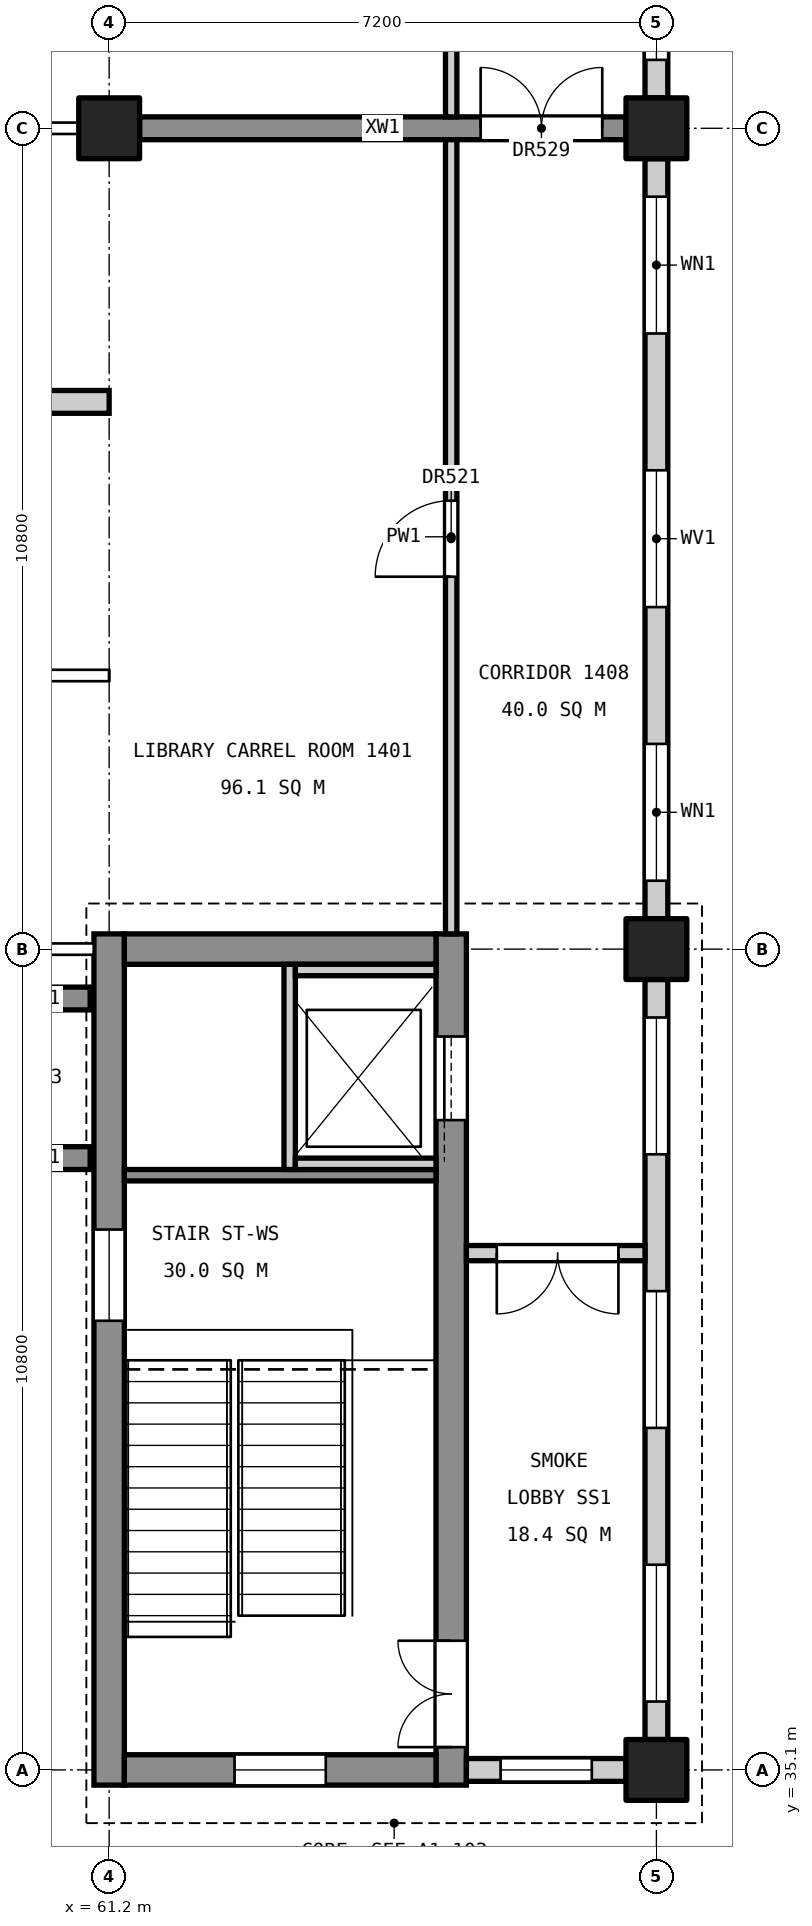
"""IFC4 building model, lengths in metres.
Left out: names, types, materials, properties, quantities, classifications, styles, units other than length and angle.
Written with IfcOpenShell. Run it as: python <this file> out.ifc"""

import sys

from ifc_helpers import new_model, si_unit, direction, frame, frame_2d, origin, origin_2d, place, context, subcontext, project, spatial, rectangle, extrude, element, fill, save


model = new_model("IFC4")
c1 = context("Model", 3, precision=1e-05, world=origin(), true_north=direction((0.0, 1.0)))
c2 = subcontext(c1, "Body", "Model", "MODEL_VIEW")
j1 = project(units=[si_unit("LENGTHUNIT", "METRE"), si_unit("PLANEANGLEUNIT", "RADIAN")], contexts=[c1])
p1 = place(None, origin())
s1 = spatial("IfcSite", under=j1, at=p1, CompositionType="ELEMENT")
p2 = place(p1, origin())
s2 = spatial("IfcBuilding", under=s1, at=p2, CompositionType="ELEMENT")
p3 = place(p2, frame((0.0, 0.0, 70.2)))
s3 = spatial("IfcBuildingStorey", under=s2, at=p3, CompositionType="ELEMENT", Elevation=70.2)
for number, where, z_axis, x_axis in (
    (1, (61.2, 56.7, 0.0), (0.0, 0.0, 1.0), (1.0, 0.0, 0.0)),
    (2, (68.4, 35.1, 0.0), (0.0, 0.0, 1.0), (1.0, 0.0, 0.0)),
    (3, (68.4, 45.9, 0.0), (0.0, 0.0, 1.0), (1.0, 0.0, 0.0)),
    (4, (68.4, 56.7, 0.0), (0.0, 0.0, 1.0), (1.0, 0.0, 0.0)),
):
    element("IfcColumn", number, at=place(p3, frame(where, z_axis=z_axis, x_axis=x_axis)), inside=s3, PredefinedType="COLUMN", context=c2, shape_type="SweptSolid", body=[
        extrude(rectangle(XDim=0.8, YDim=0.8, at=origin_2d()), origin(), (0.0, 0.0, 1.0), 4.8),
    ])
p4 = place(p3, frame((61.2, 34.9, 0.0), z_axis=(0.0, 0.0, 1.0), x_axis=(0.0, 1.0, 0.0)))
e5 = element("IfcWall", 5, at=p4, inside=s3, PredefinedType="SHEAR", context=c2, shape_type="SweptSolid", body=[
    extrude(rectangle(XDim=11.2, YDim=0.4, at=frame_2d((5.6, 0.0))), origin(), (0.0, 0.0, 1.0), 4.55),
])
p5 = place(p4, frame((6.11, 0.0, 3.4)))
e6 = element("IfcOpeningElement", 6, at=p5, cuts=e5, PredefinedType="OPENING", context=c2, shape_type="SweptSolid", body=[
    extrude(rectangle(XDim=1.2, YDim=0.9, at=frame_2d((0.6, 0.45))), frame((0.0, 0.21, 0.0), z_axis=(0.0, -1.0, 0.0), x_axis=(1.0, 0.0, 0.0)), (0.0, 0.0, 1.0), 0.42),
])
p6 = place(p3, frame((65.7, 34.9, 0.0), z_axis=(0.0, 0.0, 1.0), x_axis=(0.0, 1.0, 0.0)))
e7 = element("IfcWall", 7, at=p6, inside=s3, PredefinedType="SHEAR", context=c2, shape_type="SweptSolid", body=[
    extrude(rectangle(XDim=11.2, YDim=0.4, at=frame_2d((5.6, 0.0))), origin(), (0.0, 0.0, 1.0), 4.55),
])
p7 = place(p6, frame((0.5, 0.0, 0.0)))
e8 = element("IfcOpeningElement", 8, at=p7, cuts=e7, PredefinedType="OPENING", context=c2, shape_type="SweptSolid", body=[
    extrude(rectangle(XDim=1.4, YDim=2.1, at=frame_2d((0.7, 1.05))), frame((0.0, 0.21, 0.0), z_axis=(0.0, -1.0, 0.0), x_axis=(1.0, 0.0, 0.0)), (0.0, 0.0, 1.0), 0.42),
])
p8 = place(p6, frame((8.75, 0.0, 0.0)))
e9 = element("IfcOpeningElement", 9, at=p8, cuts=e7, PredefinedType="OPENING", context=c2, shape_type="SweptSolid", body=[
    extrude(rectangle(XDim=1.1, YDim=2.1, at=frame_2d((0.55, 1.05))), frame((0.0, 0.21, 0.0), z_axis=(0.0, -1.0, 0.0), x_axis=(1.0, 0.0, 0.0)), (0.0, 0.0, 1.0), 0.42),
])
p9 = place(p3, frame((61.4, 35.1, 0.0), z_axis=(0.0, 0.0, 1.0), x_axis=(1.0, 0.0, 0.0)))
e10 = element("IfcWall", 10, at=p9, inside=s3, PredefinedType="SHEAR", context=c2, shape_type="SweptSolid", body=[
    extrude(rectangle(XDim=4.1, YDim=0.4, at=frame_2d((2.05, 0.0))), origin(), (0.0, 0.0, 1.0), 4.55),
])
p10 = place(p9, frame((1.45, 0.0, 3.4)))
e11 = element("IfcOpeningElement", 11, at=p10, cuts=e10, PredefinedType="OPENING", context=c2, shape_type="SweptSolid", body=[
    extrude(rectangle(XDim=1.2, YDim=0.9, at=frame_2d((0.6, 0.45))), frame((0.0, 0.21, 0.0), z_axis=(0.0, -1.0, 0.0), x_axis=(1.0, 0.0, 0.0)), (0.0, 0.0, 1.0), 0.42),
])
p11 = place(p3, frame((61.4, 45.9, 0.0), z_axis=(0.0, 0.0, 1.0), x_axis=(1.0, 0.0, 0.0)))
e12 = element("IfcWall", 12, at=p11, inside=s3, PredefinedType="SHEAR", context=c2, shape_type="SweptSolid", body=[
    extrude(rectangle(XDim=4.1, YDim=0.4, at=frame_2d((2.05, 0.0))), origin(), (0.0, 0.0, 1.0), 4.55),
])
for number, where, z_axis, x_axis in (
    (13, (60.95, 43.15, 0.0), (0.0, 0.0, 1.0), (-1.0, 0.0, 0.0)),
    (14, (60.95, 45.25, 0.0), (0.0, 0.0, 1.0), (-1.0, 0.0, 0.0)),
):
    element("IfcWall", number, at=place(p3, frame(where, z_axis=z_axis, x_axis=x_axis)), inside=s3, PredefinedType="SHEAR", context=c2, shape_type="SweptSolid", body=[
        extrude(rectangle(XDim=1.25, YDim=0.3, at=frame_2d((0.625, 0.0))), origin(), (0.0, 0.0, 1.0), 4.8),
    ])
p12 = place(p3, frame((61.6, 56.7, 0.0), z_axis=(0.0, 0.0, 1.0), x_axis=(1.0, 0.0, 0.0)))
e15 = element("IfcWall", 15, at=p12, inside=s3, PredefinedType="SHEAR", context=c2, shape_type="SweptSolid", body=[
    extrude(rectangle(XDim=6.4, YDim=0.3, at=frame_2d((3.2, 0.0))), origin(), (0.0, 0.0, 1.0), 4.55),
])
p13 = place(p12, frame((4.488, 0.0, 0.0)))
e16 = element("IfcOpeningElement", 16, at=p13, cuts=e15, PredefinedType="OPENING", context=c2, shape_type="SweptSolid", body=[
    extrude(rectangle(XDim=1.6, YDim=2.1, at=frame_2d((0.8, 1.05))), frame((0.0, 0.16, 0.0), z_axis=(0.0, -1.0, 0.0), x_axis=(1.0, 0.0, 0.0)), (0.0, 0.0, 1.0), 0.32),
])
p14 = place(p3, frame((61.4, 42.925, 0.0), z_axis=(0.0, 0.0, 1.0), x_axis=(1.0, 0.0, 0.0)))
e17 = element("IfcWall", 17, at=p14, inside=s3, PredefinedType="SOLIDWALL", context=c2, shape_type="SweptSolid", body=[
    extrude(rectangle(XDim=4.1, YDim=0.15, at=frame_2d((2.05, 0.0))), origin(), (0.0, 0.0, 1.0), 4.55),
])
p15 = place(p3, frame((63.575, 43.0, 0.0), z_axis=(0.0, 0.0, 1.0), x_axis=(0.0, 1.0, 0.0)))
e18 = element("IfcWall", 18, at=p15, inside=s3, PredefinedType="SOLIDWALL", context=c2, shape_type="SweptSolid", body=[
    extrude(rectangle(XDim=2.7, YDim=0.15, at=frame_2d((1.35, 0.0))), origin(), (0.0, 0.0, 1.0), 4.55),
])
for number, where, z_axis, x_axis in (
    (19, (63.65, 43.075, 0.0), (0.0, 0.0, 1.0), (1.0, 0.0, 0.0)),
    (20, (63.65, 45.625, 0.0), (0.0, 0.0, 1.0), (1.0, 0.0, 0.0)),
):
    element("IfcWall", number, at=place(p3, frame(where, z_axis=z_axis, x_axis=x_axis)), inside=s3, PredefinedType="SOLIDWALL", context=c2, shape_type="SweptSolid", body=[
        extrude(rectangle(XDim=1.85, YDim=0.15, at=frame_2d((0.925, 0.0))), origin(), (0.0, 0.0, 1.0), 4.55),
    ])
p16 = place(p3, frame((65.9, 35.1, 0.0), z_axis=(0.0, 0.0, 1.0), x_axis=(1.0, 0.0, 0.0)))
e21 = element("IfcWall", 21, at=p16, inside=s3, PredefinedType="STANDARD", context=c2, shape_type="SweptSolid", body=[
    extrude(rectangle(XDim=2.1, YDim=0.3, at=frame_2d((1.05, 0.0))), origin(), (0.0, 0.0, 1.0), 3.85),
])
p17 = place(p16, frame((0.45, 0.0, 0.9)))
e22 = element("IfcOpeningElement", 22, at=p17, cuts=e21, PredefinedType="OPENING", context=c2, shape_type="SweptSolid", body=[
    extrude(rectangle(XDim=1.2, YDim=2.4, at=frame_2d((0.6, 1.2))), frame((0.0, 0.16, 0.0), z_axis=(0.0, -1.0, 0.0), x_axis=(1.0, 0.0, 0.0)), (0.0, 0.0, 1.0), 0.32),
])
p18 = place(p3, frame((68.4, 35.5, 0.0), z_axis=(0.0, 0.0, 1.0), x_axis=(0.0, 1.0, 0.0)))
e23 = element("IfcWall", 23, at=p18, inside=s3, PredefinedType="STANDARD", context=c2, shape_type="SweptSolid", body=[
    extrude(rectangle(XDim=10.0, YDim=0.3, at=frame_2d((5.0, 0.0))), origin(), (0.0, 0.0, 1.0), 3.55),
])
p19 = place(p18, frame((0.5, 0.0, 0.9)))
e24 = element("IfcOpeningElement", 24, at=p19, cuts=e23, PredefinedType="OPENING", context=c2, shape_type="SweptSolid", body=[
    extrude(rectangle(XDim=1.8, YDim=2.4, at=frame_2d((0.9, 1.2))), frame((0.0, 0.16, 0.0), z_axis=(0.0, -1.0, 0.0), x_axis=(1.0, 0.0, 0.0)), (0.0, 0.0, 1.0), 0.32),
])
p20 = place(p18, frame((4.1, 0.0, 0.9)))
e25 = element("IfcOpeningElement", 25, at=p20, cuts=e23, PredefinedType="OPENING", context=c2, shape_type="SweptSolid", body=[
    extrude(rectangle(XDim=1.8, YDim=2.4, at=frame_2d((0.9, 1.2))), frame((0.0, 0.16, 0.0), z_axis=(0.0, -1.0, 0.0), x_axis=(1.0, 0.0, 0.0)), (0.0, 0.0, 1.0), 0.32),
])
p21 = place(p18, frame((7.7, 0.0, 0.9)))
e26 = element("IfcOpeningElement", 26, at=p21, cuts=e23, PredefinedType="OPENING", context=c2, shape_type="SweptSolid", body=[
    extrude(rectangle(XDim=1.8, YDim=2.4, at=frame_2d((0.9, 1.2))), frame((0.0, 0.16, 0.0), z_axis=(0.0, -1.0, 0.0), x_axis=(1.0, 0.0, 0.0)), (0.0, 0.0, 1.0), 0.32),
])
p22 = place(p3, frame((68.4, 46.3, 0.0), z_axis=(0.0, 0.0, 1.0), x_axis=(0.0, 1.0, 0.0)))
e27 = element("IfcWall", 27, at=p22, inside=s3, PredefinedType="STANDARD", context=c2, shape_type="SweptSolid", body=[
    extrude(rectangle(XDim=10.0, YDim=0.3, at=frame_2d((5.0, 0.0))), origin(), (0.0, 0.0, 1.0), 3.55),
])
p23 = place(p22, frame((0.5, 0.0, 0.9)))
e28 = element("IfcOpeningElement", 28, at=p23, cuts=e27, PredefinedType="OPENING", context=c2, shape_type="SweptSolid", body=[
    extrude(rectangle(XDim=1.8, YDim=2.4, at=frame_2d((0.9, 1.2))), frame((0.0, 0.16, 0.0), z_axis=(0.0, -1.0, 0.0), x_axis=(1.0, 0.0, 0.0)), (0.0, 0.0, 1.0), 0.32),
])
p24 = place(p22, frame((4.1, 0.0, 0.9)))
e29 = element("IfcOpeningElement", 29, at=p24, cuts=e27, PredefinedType="OPENING", context=c2, shape_type="SweptSolid", body=[
    extrude(rectangle(XDim=1.8, YDim=2.4, at=frame_2d((0.9, 1.2))), frame((0.0, 0.16, 0.0), z_axis=(0.0, -1.0, 0.0), x_axis=(1.0, 0.0, 0.0)), (0.0, 0.0, 1.0), 0.32),
])
p25 = place(p22, frame((7.7, 0.0, 0.9)))
e30 = element("IfcOpeningElement", 30, at=p25, cuts=e27, PredefinedType="OPENING", context=c2, shape_type="SweptSolid", body=[
    extrude(rectangle(XDim=1.8, YDim=2.4, at=frame_2d((0.9, 1.2))), frame((0.0, 0.16, 0.0), z_axis=(0.0, -1.0, 0.0), x_axis=(1.0, 0.0, 0.0)), (0.0, 0.0, 1.0), 0.32),
])
p26 = place(p3, frame((68.4, 57.1, 0.0), z_axis=(0.0, 0.0, 1.0), x_axis=(0.0, 1.0, 0.0)))
e31 = element("IfcWall", 31, at=p26, inside=s3, PredefinedType="STANDARD", context=c2, shape_type="SweptSolid", body=[
    extrude(rectangle(XDim=10.0, YDim=0.3, at=frame_2d((5.0, 0.0))), origin(), (0.0, 0.0, 1.0), 3.55),
])
p27 = place(p26, frame((0.5, 0.0, 0.9)))
e32 = element("IfcOpeningElement", 32, at=p27, cuts=e31, PredefinedType="OPENING", context=c2, shape_type="SweptSolid", body=[
    extrude(rectangle(XDim=1.8, YDim=2.4, at=frame_2d((0.9, 1.2))), frame((0.0, 0.16, 0.0), z_axis=(0.0, -1.0, 0.0), x_axis=(1.0, 0.0, 0.0)), (0.0, 0.0, 1.0), 0.32),
])
p28 = place(p26, frame((4.1, 0.0, 0.9)))
e33 = element("IfcOpeningElement", 33, at=p28, cuts=e31, PredefinedType="OPENING", context=c2, shape_type="SweptSolid", body=[
    extrude(rectangle(XDim=1.8, YDim=2.4, at=frame_2d((0.9, 1.2))), frame((0.0, 0.16, 0.0), z_axis=(0.0, -1.0, 0.0), x_axis=(1.0, 0.0, 0.0)), (0.0, 0.0, 1.0), 0.32),
])
p29 = place(p26, frame((7.7, 0.0, 0.9)))
e34 = element("IfcOpeningElement", 34, at=p29, cuts=e31, PredefinedType="OPENING", context=c2, shape_type="SweptSolid", body=[
    extrude(rectangle(XDim=1.8, YDim=2.4, at=frame_2d((0.9, 1.2))), frame((0.0, 0.16, 0.0), z_axis=(0.0, -1.0, 0.0), x_axis=(1.0, 0.0, 0.0)), (0.0, 0.0, 1.0), 0.32),
])
p30 = place(p3, frame((56.4, 53.1, 0.0), z_axis=(0.0, 0.0, 1.0), x_axis=(1.0, 0.0, 0.0)))
e35 = element("IfcWall", 35, at=p30, inside=s3, PredefinedType="STANDARD", context=c2, shape_type="SweptSolid", body=[
    extrude(rectangle(XDim=4.8, YDim=0.3, at=frame_2d((2.4, 0.0))), origin(), (0.0, 0.0, 1.0), 3.65),
])
p31 = place(p3, frame((65.7, 46.1, 0.0), z_axis=(0.0, 0.0, 1.0), x_axis=(0.0, 1.0, 0.0)))
e36 = element("IfcWall", 36, at=p31, inside=s3, PredefinedType="PARTITIONING", context=c2, shape_type="SweptSolid", body=[
    extrude(rectangle(XDim=10.45, YDim=0.15, at=frame_2d((5.225, 0.0))), origin(), (0.0, 0.0, 1.0), 3.55),
])
p32 = place(p31, frame((4.7, 0.0, 0.0)))
e37 = element("IfcOpeningElement", 37, at=p32, cuts=e36, PredefinedType="OPENING", context=c2, shape_type="SweptSolid", body=[
    extrude(rectangle(XDim=1.0, YDim=2.1, at=frame_2d((0.5, 1.05))), frame((0.0, 0.085, 0.0), z_axis=(0.0, -1.0, 0.0), x_axis=(1.0, 0.0, 0.0)), (0.0, 0.0, 1.0), 0.17),
])
p33 = place(p3, frame((65.7, 56.85, 0.0), z_axis=(0.0, 0.0, 1.0), x_axis=(0.0, 1.0, 0.0)))
e38 = element("IfcWall", 38, at=p33, inside=s3, PredefinedType="PARTITIONING", context=c2, shape_type="SweptSolid", body=[
    extrude(rectangle(XDim=3.25, YDim=0.15, at=frame_2d((1.625, 0.0))), origin(), (0.0, 0.0, 1.0), 3.55),
])
p34 = place(p33, frame((1.15, 0.0, 0.0)))
e39 = element("IfcOpeningElement", 39, at=p34, cuts=e38, PredefinedType="OPENING", context=c2, shape_type="SweptSolid", body=[
    extrude(rectangle(XDim=1.0, YDim=2.1, at=frame_2d((0.5, 1.05))), frame((0.0, 0.085, 0.0), z_axis=(0.0, -1.0, 0.0), x_axis=(1.0, 0.0, 0.0)), (0.0, 0.0, 1.0), 0.17),
])
p35 = place(p3, frame((65.9, 41.9, 0.0), z_axis=(0.0, 0.0, 1.0), x_axis=(1.0, 0.0, 0.0)))
e40 = element("IfcWall", 40, at=p35, inside=s3, PredefinedType="PARTITIONING", context=c2, shape_type="SweptSolid", body=[
    extrude(rectangle(XDim=2.35, YDim=0.2, at=frame_2d((1.175, 0.0))), origin(), (0.0, 0.0, 1.0), 3.55),
])
p36 = place(p35, frame((0.4, 0.0, 0.0)))
e41 = element("IfcOpeningElement", 41, at=p36, cuts=e40, PredefinedType="OPENING", context=c2, shape_type="SweptSolid", body=[
    extrude(rectangle(XDim=1.6, YDim=2.1, at=frame_2d((0.8, 1.05))), frame((0.0, 0.11, 0.0), z_axis=(0.0, -1.0, 0.0), x_axis=(1.0, 0.0, 0.0)), (0.0, 0.0, 1.0), 0.22),
])
p37 = place(p7, origin())
e42 = element("IfcDoor", 42, at=p37, inside=s3, OperationType="DOUBLE_DOOR_SINGLE_SWING", PredefinedType="DOOR", context=c2, shape_type="SweptSolid", body=[
    extrude(rectangle(XDim=1.4, YDim=2.1, at=frame_2d((0.7, 1.05))), frame((0.0, 0.025, 0.0), z_axis=(0.0, -1.0, 0.0), x_axis=(1.0, 0.0, 0.0)), (0.0, 0.0, 1.0), 0.05),
])
fill(e8, e42)
p38 = place(p8, origin())
e43 = element("IfcDoor", 43, at=p38, inside=s3, OperationType="SLIDING_TO_LEFT", PredefinedType="DOOR", context=c2, shape_type="SweptSolid", body=[
    extrude(rectangle(XDim=1.1, YDim=2.1, at=frame_2d((0.55, 1.05))), frame((0.0, 0.025, 0.0), z_axis=(0.0, -1.0, 0.0), x_axis=(1.0, 0.0, 0.0)), (0.0, 0.0, 1.0), 0.05),
])
fill(e9, e43)
p39 = place(p17, origin())
e44 = element("IfcWindow", 44, at=p39, inside=s3, PartitioningType="SINGLE_PANEL", PredefinedType="WINDOW", context=c2, shape_type="SweptSolid", body=[
    extrude(rectangle(XDim=1.2, YDim=2.4, at=frame_2d((0.6, 1.2))), frame((0.0, 0.03, 0.0), z_axis=(0.0, -1.0, 0.0), x_axis=(1.0, 0.0, 0.0)), (0.0, 0.0, 1.0), 0.06),
])
fill(e22, e44)
p40 = place(p19, origin())
e45 = element("IfcWindow", 45, at=p40, inside=s3, PartitioningType="SINGLE_PANEL", PredefinedType="WINDOW", context=c2, shape_type="SweptSolid", body=[
    extrude(rectangle(XDim=1.8, YDim=2.4, at=frame_2d((0.9, 1.2))), frame((0.0, 0.03, 0.0), z_axis=(0.0, -1.0, 0.0), x_axis=(1.0, 0.0, 0.0)), (0.0, 0.0, 1.0), 0.06),
])
fill(e24, e45)
p41 = place(p20, origin())
e46 = element("IfcWindow", 46, at=p41, inside=s3, PartitioningType="SINGLE_PANEL", PredefinedType="WINDOW", context=c2, shape_type="SweptSolid", body=[
    extrude(rectangle(XDim=1.8, YDim=2.4, at=frame_2d((0.9, 1.2))), frame((0.0, 0.03, 0.0), z_axis=(0.0, -1.0, 0.0), x_axis=(1.0, 0.0, 0.0)), (0.0, 0.0, 1.0), 0.06),
])
fill(e25, e46)
p42 = place(p21, origin())
e47 = element("IfcWindow", 47, at=p42, inside=s3, PartitioningType="SINGLE_PANEL", PredefinedType="WINDOW", context=c2, shape_type="SweptSolid", body=[
    extrude(rectangle(XDim=1.8, YDim=2.4, at=frame_2d((0.9, 1.2))), frame((0.0, 0.03, 0.0), z_axis=(0.0, -1.0, 0.0), x_axis=(1.0, 0.0, 0.0)), (0.0, 0.0, 1.0), 0.06),
])
fill(e26, e47)
p43 = place(p23, origin())
e48 = element("IfcWindow", 48, at=p43, inside=s3, PartitioningType="SINGLE_PANEL", PredefinedType="WINDOW", context=c2, shape_type="SweptSolid", body=[
    extrude(rectangle(XDim=1.8, YDim=2.4, at=frame_2d((0.9, 1.2))), frame((0.0, 0.03, 0.0), z_axis=(0.0, -1.0, 0.0), x_axis=(1.0, 0.0, 0.0)), (0.0, 0.0, 1.0), 0.06),
])
fill(e28, e48)
p44 = place(p24, origin())
e49 = element("IfcWindow", 49, at=p44, inside=s3, PartitioningType="SINGLE_PANEL", PredefinedType="WINDOW", context=c2, shape_type="SweptSolid", body=[
    extrude(rectangle(XDim=1.8, YDim=2.4, at=frame_2d((0.9, 1.2))), frame((0.0, 0.03, 0.0), z_axis=(0.0, -1.0, 0.0), x_axis=(1.0, 0.0, 0.0)), (0.0, 0.0, 1.0), 0.06),
])
fill(e29, e49)
p45 = place(p25, origin())
e50 = element("IfcWindow", 50, at=p45, inside=s3, PartitioningType="SINGLE_PANEL", PredefinedType="WINDOW", context=c2, shape_type="SweptSolid", body=[
    extrude(rectangle(XDim=1.8, YDim=2.4, at=frame_2d((0.9, 1.2))), frame((0.0, 0.03, 0.0), z_axis=(0.0, -1.0, 0.0), x_axis=(1.0, 0.0, 0.0)), (0.0, 0.0, 1.0), 0.06),
])
fill(e30, e50)
p46 = place(p27, origin())
e51 = element("IfcWindow", 51, at=p46, inside=s3, PartitioningType="SINGLE_PANEL", PredefinedType="WINDOW", context=c2, shape_type="SweptSolid", body=[
    extrude(rectangle(XDim=1.8, YDim=2.4, at=frame_2d((0.9, 1.2))), frame((0.0, 0.03, 0.0), z_axis=(0.0, -1.0, 0.0), x_axis=(1.0, 0.0, 0.0)), (0.0, 0.0, 1.0), 0.06),
])
fill(e32, e51)
p47 = place(p5, origin())
e52 = element("IfcWindow", 52, at=p47, inside=s3, PartitioningType="SINGLE_PANEL", PredefinedType="WINDOW", context=c2, shape_type="SweptSolid", body=[
    extrude(rectangle(XDim=1.2, YDim=0.9, at=frame_2d((0.6, 0.45))), frame((0.0, 0.03, 0.0), z_axis=(0.0, -1.0, 0.0), x_axis=(1.0, 0.0, 0.0)), (0.0, 0.0, 1.0), 0.06),
])
fill(e6, e52)
p48 = place(p10, origin())
e53 = element("IfcWindow", 53, at=p48, inside=s3, PartitioningType="SINGLE_PANEL", PredefinedType="WINDOW", context=c2, shape_type="SweptSolid", body=[
    extrude(rectangle(XDim=1.2, YDim=0.9, at=frame_2d((0.6, 0.45))), frame((0.0, 0.03, 0.0), z_axis=(0.0, -1.0, 0.0), x_axis=(1.0, 0.0, 0.0)), (0.0, 0.0, 1.0), 0.06),
])
fill(e11, e53)
p49 = place(p32, origin())
e54 = element("IfcDoor", 54, at=p49, inside=s3, OperationType="SINGLE_SWING_LEFT", PredefinedType="DOOR", context=c2, shape_type="SweptSolid", body=[
    extrude(rectangle(XDim=1.0, YDim=2.1, at=frame_2d((0.5, 1.05))), frame((0.0, 0.025, 0.0), z_axis=(0.0, -1.0, 0.0), x_axis=(1.0, 0.0, 0.0)), (0.0, 0.0, 1.0), 0.05),
])
fill(e37, e54)
p50 = place(p36, frame((1.6, 0.0, 0.0), z_axis=(0.0, 0.0, 1.0), x_axis=(-1.0, 0.0, 0.0)))
e55 = element("IfcDoor", 55, at=p50, inside=s3, OperationType="DOUBLE_DOOR_SINGLE_SWING", PredefinedType="DOOR", context=c2, shape_type="SweptSolid", body=[
    extrude(rectangle(XDim=1.6, YDim=2.1, at=frame_2d((0.8, 1.05))), frame((0.0, 0.025, 0.0), z_axis=(0.0, -1.0, 0.0), x_axis=(1.0, 0.0, 0.0)), (0.0, 0.0, 1.0), 0.05),
])
fill(e41, e55)
p51 = place(p13, origin())
e56 = element("IfcDoor", 56, at=p51, inside=s3, OperationType="DOUBLE_DOOR_SINGLE_SWING", PredefinedType="DOOR", context=c2, shape_type="SweptSolid", body=[
    extrude(rectangle(XDim=1.6, YDim=2.1, at=frame_2d((0.8, 1.05))), frame((0.0, 0.025, 0.0), z_axis=(0.0, -1.0, 0.0), x_axis=(1.0, 0.0, 0.0)), (0.0, 0.0, 1.0), 0.05),
])
fill(e16, e56)
save(model, sys.argv[1])
